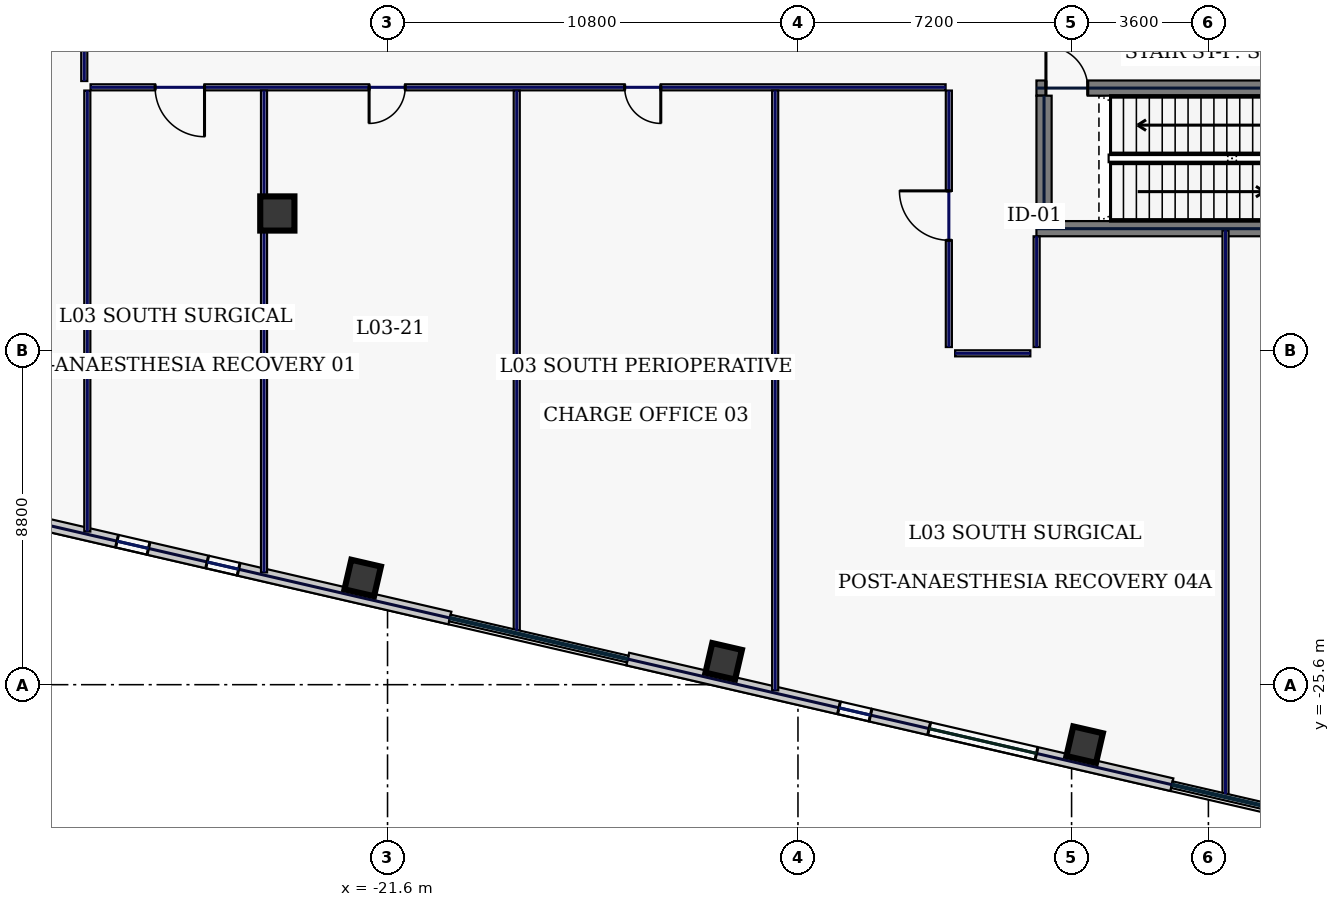
"""IFC4 building model, lengths in metres.
Left out: names, types, materials, properties, quantities, classifications, styles, units other than length and angle.
Written with IfcOpenShell. Run it as: python <this file> out.ifc"""

import sys

from ifc_helpers import new_model, si_unit, direction, frame, frame_2d, origin, origin_2d, place, context, subcontext, project, spatial, rectangle, hollow_rectangle, extrude, element, fill, save


model = new_model("IFC4")
c1 = context("Model", 3, precision=1e-05, world=origin(), true_north=direction((0.0, 1.0)))
c2 = subcontext(c1, "Body", "Model", "MODEL_VIEW")
j1 = project(units=[si_unit("LENGTHUNIT", "METRE"), si_unit("PLANEANGLEUNIT", "RADIAN")], contexts=[c1])
p1 = place(None, origin())
s1 = spatial("IfcSite", under=j1, at=p1, CompositionType="ELEMENT")
p2 = place(p1, origin())
s2 = spatial("IfcBuilding", under=s1, at=p2, CompositionType="ELEMENT")
p3 = place(p2, frame((0.0, 0.0, 18.4)))
s3 = spatial("IfcBuildingStorey", under=s2, at=p3, CompositionType="ELEMENT", Elevation=18.4)
p4 = place(p3, frame((-4.525, -13.6, 0.0), z_axis=(0.0, 0.0, 1.0), x_axis=(1.0, 0.0, 0.0)))
e1 = element("IfcWall", 1, at=p4, inside=s3, PredefinedType="SHEAR", context=c2, shape_type="SweptSolid", body=[
    extrude(rectangle(XDim=9.05, YDim=0.4, at=frame_2d((4.525, 0.0))), origin(), (0.0, 0.0, 1.0), 4.7),
])
p5 = place(p3, frame((-4.525, -9.9, 0.0), z_axis=(0.0, 0.0, 1.0), x_axis=(1.0, 0.0, 0.0)))
e2 = element("IfcWall", 2, at=p5, inside=s3, PredefinedType="SHEAR", context=c2, shape_type="SweptSolid", body=[
    extrude(rectangle(XDim=9.05, YDim=0.4, at=frame_2d((4.525, 0.0))), origin(), (0.0, 0.0, 1.0), 4.7),
])
p6 = place(p5, frame((0.25, 0.0, 0.0)))
e3 = element("IfcOpeningElement", 3, at=p6, cuts=e2, PredefinedType="OPENING", context=c2, shape_type="SweptSolid", body=[
    extrude(rectangle(XDim=1.1, YDim=2.2, at=frame_2d((0.55, 1.1))), frame((0.0, 0.21, 0.0), z_axis=(0.0, -1.0, 0.0), x_axis=(1.0, 0.0, 0.0)), (0.0, 0.0, 1.0), 0.42),
])
p7 = place(p3, frame((-4.325, -13.4, 0.0), z_axis=(0.0, 0.0, 1.0), x_axis=(0.0, 1.0, 0.0)))
e4 = element("IfcWall", 4, at=p7, inside=s3, PredefinedType="SHEAR", context=c2, shape_type="SweptSolid", body=[
    extrude(rectangle(XDim=3.3, YDim=0.4, at=frame_2d((1.65, 0.0))), origin(), (0.0, 0.0, 1.0), 4.7),
])
p8 = place(p3, frame((-24.5, -13.2, 0.0), z_axis=(0.0, 0.0, 1.0), x_axis=(1.0, 0.0, 0.0)))
e5 = element("IfcColumn", 5, at=p8, inside=s3, PredefinedType="COLUMN", context=c2, shape_type="SweptSolid", body=[
    extrude(hollow_rectangle(XDim=0.9, YDim=0.9, WallThickness=0.04, at=origin_2d()), origin(), (0.0, 0.0, 1.0), 4.7),
])
for number, where, z_axis, x_axis in (
    (6, (-22.254, -22.792, 0.0), (0.0, 0.0, 1.0), (0.974, -0.225, 0.0)),
    (7, (-12.755, -24.985, 0.0), (0.0, 0.0, 1.0), (0.974, -0.225, 0.0)),
    (8, (-3.256, -27.178, 0.0), (0.0, 0.0, 1.0), (0.974, -0.225, 0.0)),
):
    element("IfcColumn", number, at=place(p3, frame(where, z_axis=z_axis, x_axis=x_axis)), inside=s3, PredefinedType="COLUMN", context=c2, shape_type="SweptSolid", body=[
        extrude(hollow_rectangle(XDim=0.8, YDim=0.8, WallThickness=0.036, at=origin_2d()), origin(), (0.0, 0.0, 1.0), 4.7),
    ])
p9 = place(p3, frame((-42.029, -18.75, 0.0), z_axis=(0.0, 0.0, 1.0), x_axis=(0.97436993772, -0.224951604723, 0.0)))
e9 = element("IfcWall", 9, at=p9, inside=s3, PredefinedType="STANDARD", context=c2, shape_type="SweptSolid", body=[
    extrude(rectangle(XDim=22.651, YDim=0.34, at=frame_2d((11.326, 0.0))), origin(), (0.0, 0.0, 1.0), 4.7),
])
p10 = place(p9, frame((1.862, 0.0, 0.85)))
e10 = element("IfcOpeningElement", 10, at=p10, cuts=e9, PredefinedType="OPENING", context=c2, shape_type="SweptSolid", body=[
    extrude(rectangle(XDim=2.9, YDim=2.3, at=frame_2d((1.45, 1.15))), frame((0.0, 0.18, 0.0), z_axis=(0.0, -1.0, 0.0), x_axis=(1.0, 0.0, 0.0)), (0.0, 0.0, 1.0), 0.36),
])
p11 = place(p9, frame((6.346, 0.0, 0.85)))
e11 = element("IfcOpeningElement", 11, at=p11, cuts=e9, PredefinedType="OPENING", context=c2, shape_type="SweptSolid", body=[
    extrude(rectangle(XDim=2.9, YDim=2.3, at=frame_2d((1.45, 1.15))), frame((0.0, 0.18, 0.0), z_axis=(0.0, -1.0, 0.0), x_axis=(1.0, 0.0, 0.0)), (0.0, 0.0, 1.0), 0.36),
])
p12 = place(p9, frame((13.661, 0.0, 0.85)))
e12 = element("IfcOpeningElement", 12, at=p12, cuts=e9, PredefinedType="OPENING", context=c2, shape_type="SweptSolid", body=[
    extrude(rectangle(XDim=0.85, YDim=1.85, at=frame_2d((0.425, 0.925))), frame((0.0, 0.18, 0.0), z_axis=(0.0, -1.0, 0.0), x_axis=(1.0, 0.0, 0.0)), (0.0, 0.0, 1.0), 0.36),
])
p13 = place(p9, frame((16.095, 0.0, 0.85)))
e13 = element("IfcOpeningElement", 13, at=p13, cuts=e9, PredefinedType="OPENING", context=c2, shape_type="SweptSolid", body=[
    extrude(rectangle(XDim=0.85, YDim=1.85, at=frame_2d((0.425, 0.925))), frame((0.0, 0.18, 0.0), z_axis=(0.0, -1.0, 0.0), x_axis=(1.0, 0.0, 0.0)), (0.0, 0.0, 1.0), 0.36),
])
p14 = place(p3, frame((-15.281, -24.925, 0.0), z_axis=(0.0, 0.0, 1.0), x_axis=(0.974370193991, -0.22495049469, 0.0)))
e14 = element("IfcWall", 14, at=p14, inside=s3, PredefinedType="STANDARD", context=c2, shape_type="SweptSolid", body=[
    extrude(rectangle(XDim=14.697, YDim=0.34, at=frame_2d((7.349, 0.0))), origin(), (0.0, 0.0, 1.0), 4.7),
])
p15 = place(p14, frame((5.706, 0.0, 0.85)))
e15 = element("IfcOpeningElement", 15, at=p15, cuts=e14, PredefinedType="OPENING", context=c2, shape_type="SweptSolid", body=[
    extrude(rectangle(XDim=0.85, YDim=1.85, at=frame_2d((0.425, 0.925))), frame((0.0, 0.18, 0.0), z_axis=(0.0, -1.0, 0.0), x_axis=(1.0, 0.0, 0.0)), (0.0, 0.0, 1.0), 0.36),
])
p16 = place(p14, frame((8.141, 0.0, 0.85)))
e16 = element("IfcOpeningElement", 16, at=p16, cuts=e14, PredefinedType="OPENING", context=c2, shape_type="SweptSolid", body=[
    extrude(rectangle(XDim=2.9, YDim=2.3, at=frame_2d((1.45, 1.15))), frame((0.0, 0.18, 0.0), z_axis=(0.0, -1.0, 0.0), x_axis=(1.0, 0.0, 0.0)), (0.0, 0.0, 1.0), 0.36),
])
p17 = place(p3, frame((-29.58, -9.715, 0.0), z_axis=(0.0, 0.0, 1.0), x_axis=(0.0, 1.0, 0.0)))
e17 = element("IfcWall", 17, at=p17, inside=s3, PredefinedType="PARTITIONING", context=c2, shape_type="SweptSolid", body=[
    extrude(rectangle(XDim=19.43, YDim=0.16, at=frame_2d((9.715, 0.0))), origin(), (0.0, 0.0, 1.0), 4.7),
])
p18 = place(p17, frame((2.019, 0.0, 0.0)))
e18 = element("IfcOpeningElement", 18, at=p18, cuts=e17, PredefinedType="OPENING", context=c2, shape_type="SweptSolid", body=[
    extrude(rectangle(XDim=0.95, YDim=2.2, at=frame_2d((0.475, 1.1))), frame((0.0, 0.09, 0.0), z_axis=(0.0, -1.0, 0.0), x_axis=(1.0, 0.0, 0.0)), (0.0, 0.0, 1.0), 0.18),
])
p19 = place(p17, frame((6.725, 0.0, 0.0)))
e19 = element("IfcOpeningElement", 19, at=p19, cuts=e17, PredefinedType="OPENING", context=c2, shape_type="SweptSolid", body=[
    extrude(rectangle(XDim=0.95, YDim=2.2, at=frame_2d((0.475, 1.1))), frame((0.0, 0.09, 0.0), z_axis=(0.0, -1.0, 0.0), x_axis=(1.0, 0.0, 0.0)), (0.0, 0.0, 1.0), 0.18),
])
p20 = place(p17, frame((11.925, 0.0, 0.0)))
e20 = element("IfcOpeningElement", 20, at=p20, cuts=e17, PredefinedType="OPENING", context=c2, shape_type="SweptSolid", body=[
    extrude(rectangle(XDim=0.95, YDim=2.2, at=frame_2d((0.475, 1.1))), frame((0.0, 0.09, 0.0), z_axis=(0.0, -1.0, 0.0), x_axis=(1.0, 0.0, 0.0)), (0.0, 0.0, 1.0), 0.18),
])
p21 = place(p17, frame((16.631, 0.0, 0.0)))
e21 = element("IfcOpeningElement", 21, at=p21, cuts=e17, PredefinedType="OPENING", context=c2, shape_type="SweptSolid", body=[
    extrude(rectangle(XDim=0.95, YDim=2.2, at=frame_2d((0.475, 1.1))), frame((0.0, 0.09, 0.0), z_axis=(0.0, -1.0, 0.0), x_axis=(1.0, 0.0, 0.0)), (0.0, 0.0, 1.0), 0.18),
])
p22 = place(p3, frame((-4.52, -13.8, 0.0), z_axis=(0.0, 0.0, 1.0), x_axis=(0.0, -1.0, 0.0)))
e22 = element("IfcWall", 22, at=p22, inside=s3, PredefinedType="PARTITIONING", context=c2, shape_type="SweptSolid", body=[
    extrude(rectangle(XDim=2.915, YDim=0.16, at=frame_2d((1.458, 0.0))), origin(), (0.0, 0.0, 1.0), 4.7),
])
p23 = place(p3, frame((-4.685, -16.88, 0.0), z_axis=(0.0, 0.0, 1.0), x_axis=(-1.0, 0.0, 0.0)))
e23 = element("IfcWall", 23, at=p23, inside=s3, PredefinedType="PARTITIONING", context=c2, shape_type="SweptSolid", body=[
    extrude(rectangle(XDim=1.98, YDim=0.16, at=frame_2d((0.99, 0.0))), origin(), (0.0, 0.0, 1.0), 4.7),
])
p24 = place(p3, frame((-6.83, -16.715, 0.0), z_axis=(0.0, 0.0, 1.0), x_axis=(0.0, 1.0, 0.0)))
e24 = element("IfcWall", 24, at=p24, inside=s3, PredefinedType="PARTITIONING", context=c2, shape_type="SweptSolid", body=[
    extrude(rectangle(XDim=6.75, YDim=0.16, at=frame_2d((3.375, 0.0))), origin(), (0.0, 0.0, 1.0), 4.7),
])
p25 = place(p24, frame((2.81, 0.0, 0.0)))
e25 = element("IfcOpeningElement", 25, at=p25, cuts=e24, PredefinedType="OPENING", context=c2, shape_type="SweptSolid", body=[
    extrude(rectangle(XDim=1.3, YDim=2.2, at=frame_2d((0.65, 1.1))), frame((0.0, 0.09, 0.0), z_axis=(0.0, -1.0, 0.0), x_axis=(1.0, 0.0, 0.0)), (0.0, 0.0, 1.0), 0.18),
])
p26 = place(p3, frame((-6.915, -9.88, 0.0), z_axis=(0.0, 0.0, 1.0), x_axis=(-1.0, 0.0, 0.0)))
e26 = element("IfcWall", 26, at=p26, inside=s3, PredefinedType="PARTITIONING", context=c2, shape_type="SweptSolid", body=[
    extrude(rectangle(XDim=22.5, YDim=0.16, at=frame_2d((11.25, 0.0))), origin(), (0.0, 0.0, 1.0), 4.7),
])
p27 = place(p26, frame((19.501, 0.0, 0.0)))
e27 = element("IfcOpeningElement", 27, at=p27, cuts=e26, PredefinedType="OPENING", context=c2, shape_type="SweptSolid", body=[
    extrude(rectangle(XDim=1.3, YDim=2.2, at=frame_2d((0.65, 1.1))), frame((0.0, 0.09, 0.0), z_axis=(0.0, -1.0, 0.0), x_axis=(1.0, 0.0, 0.0)), (0.0, 0.0, 1.0), 0.18),
])
p28 = place(p26, frame((14.22, 0.0, 0.0)))
e28 = element("IfcOpeningElement", 28, at=p28, cuts=e26, PredefinedType="OPENING", context=c2, shape_type="SweptSolid", body=[
    extrude(rectangle(XDim=0.95, YDim=2.2, at=frame_2d((0.475, 1.1))), frame((0.0, 0.09, 0.0), z_axis=(0.0, -1.0, 0.0), x_axis=(1.0, 0.0, 0.0)), (0.0, 0.0, 1.0), 0.18),
])
p29 = place(p26, frame((7.495, 0.0, 0.0)))
e29 = element("IfcOpeningElement", 29, at=p29, cuts=e26, PredefinedType="OPENING", context=c2, shape_type="SweptSolid", body=[
    extrude(rectangle(XDim=0.95, YDim=2.2, at=frame_2d((0.475, 1.1))), frame((0.0, 0.09, 0.0), z_axis=(0.0, -1.0, 0.0), x_axis=(1.0, 0.0, 0.0)), (0.0, 0.0, 1.0), 0.18),
])
p30 = place(p3, frame((-29.5, -21.571, 0.0), z_axis=(0.0, 0.0, 1.0), x_axis=(0.0, 1.0, 0.0)))
e30 = element("IfcWall", 30, at=p30, inside=s3, PredefinedType="PARTITIONING", context=c2, shape_type="SweptSolid", body=[
    extrude(rectangle(XDim=11.605, YDim=0.16, at=frame_2d((5.803, 0.0))), origin(), (0.0, 0.0, 1.0), 4.7),
])
p31 = place(p3, frame((-24.85, -22.644, 0.0), z_axis=(0.0, 0.0, 1.0), x_axis=(0.0, 1.0, 0.0)))
e31 = element("IfcWall", 31, at=p31, inside=s3, PredefinedType="PARTITIONING", context=c2, shape_type="SweptSolid", body=[
    extrude(rectangle(XDim=12.679, YDim=0.16, at=frame_2d((6.339, 0.0))), origin(), (0.0, 0.0, 1.0), 4.7),
])
p32 = place(p3, frame((-18.2, -24.179, 0.0), z_axis=(0.0, 0.0, 1.0), x_axis=(0.0, 1.0, 0.0)))
e32 = element("IfcWall", 32, at=p32, inside=s3, PredefinedType="PARTITIONING", context=c2, shape_type="SweptSolid", body=[
    extrude(rectangle(XDim=14.214, YDim=0.16, at=frame_2d((7.107, 0.0))), origin(), (0.0, 0.0, 1.0), 4.7),
])
p33 = place(p3, frame((-11.4, -25.749, 0.0), z_axis=(0.0, 0.0, 1.0), x_axis=(0.0, 1.0, 0.0)))
e33 = element("IfcWall", 33, at=p33, inside=s3, PredefinedType="PARTITIONING", context=c2, shape_type="SweptSolid", body=[
    extrude(rectangle(XDim=15.784, YDim=0.16, at=frame_2d((7.892, 0.0))), origin(), (0.0, 0.0, 1.0), 4.7),
])
p34 = place(p3, frame((0.45, -28.485, 0.0), z_axis=(0.0, 0.0, 1.0), x_axis=(0.0, 1.0, 0.0)))
e34 = element("IfcWall", 34, at=p34, inside=s3, PredefinedType="PARTITIONING", context=c2, shape_type="SweptSolid", body=[
    extrude(rectangle(XDim=14.845, YDim=0.16, at=frame_2d((7.423, 0.0))), origin(), (0.0, 0.0, 1.0), 4.7),
])
p35 = place(p12, origin())
e35 = element("IfcWindow", 35, at=p35, inside=s3, PartitioningType="SINGLE_PANEL", PredefinedType="WINDOW", context=c2, shape_type="SweptSolid", body=[
    extrude(rectangle(XDim=0.85, YDim=1.85, at=frame_2d((0.425, 0.925))), frame((0.0, 0.03, 0.0), z_axis=(0.0, -1.0, 0.0), x_axis=(1.0, 0.0, 0.0)), (0.0, 0.0, 1.0), 0.06),
])
fill(e12, e35)
p36 = place(p13, origin())
e36 = element("IfcWindow", 36, at=p36, inside=s3, PartitioningType="SINGLE_PANEL", PredefinedType="WINDOW", context=c2, shape_type="SweptSolid", body=[
    extrude(rectangle(XDim=0.85, YDim=1.85, at=frame_2d((0.425, 0.925))), frame((0.0, 0.03, 0.0), z_axis=(0.0, -1.0, 0.0), x_axis=(1.0, 0.0, 0.0)), (0.0, 0.0, 1.0), 0.06),
])
fill(e13, e36)
p37 = place(p15, origin())
e37 = element("IfcWindow", 37, at=p37, inside=s3, PartitioningType="SINGLE_PANEL", PredefinedType="WINDOW", context=c2, shape_type="SweptSolid", body=[
    extrude(rectangle(XDim=0.85, YDim=1.85, at=frame_2d((0.425, 0.925))), frame((0.0, 0.03, 0.0), z_axis=(0.0, -1.0, 0.0), x_axis=(1.0, 0.0, 0.0)), (0.0, 0.0, 1.0), 0.06),
])
fill(e15, e37)
p38 = place(p16, origin())
e38 = element("IfcWindow", 38, at=p38, inside=s3, PartitioningType="SINGLE_PANEL", PredefinedType="WINDOW", context=c2, shape_type="SweptSolid", body=[
    extrude(rectangle(XDim=2.9, YDim=2.3, at=frame_2d((1.45, 1.15))), frame((0.0, 0.03, 0.0), z_axis=(0.0, -1.0, 0.0), x_axis=(1.0, 0.0, 0.0)), (0.0, 0.0, 1.0), 0.06),
])
fill(e16, e38)
p39 = place(p6, origin())
e39 = element("IfcDoor", 39, at=p39, inside=s3, OperationType="SINGLE_SWING_LEFT", PredefinedType="DOOR", context=c2, shape_type="SweptSolid", body=[
    extrude(rectangle(XDim=1.1, YDim=2.2, at=frame_2d((0.55, 1.1))), frame((0.0, 0.025, 0.0), z_axis=(0.0, -1.0, 0.0), x_axis=(1.0, 0.0, 0.0)), (0.0, 0.0, 1.0), 0.05),
])
fill(e3, e39)
p40 = place(p27, origin())
e40 = element("IfcDoor", 40, at=p40, inside=s3, OperationType="SINGLE_SWING_LEFT", PredefinedType="DOOR", context=c2, shape_type="SweptSolid", body=[
    extrude(rectangle(XDim=1.3, YDim=2.2, at=frame_2d((0.65, 1.1))), frame((0.0, 0.025, 0.0), z_axis=(0.0, -1.0, 0.0), x_axis=(1.0, 0.0, 0.0)), (0.0, 0.0, 1.0), 0.05),
])
fill(e27, e40)
p41 = place(p28, origin())
e41 = element("IfcDoor", 41, at=p41, inside=s3, OperationType="SINGLE_SWING_RIGHT", PredefinedType="DOOR", context=c2, shape_type="SweptSolid", body=[
    extrude(rectangle(XDim=0.95, YDim=2.2, at=frame_2d((0.475, 1.1))), frame((0.0, 0.025, 0.0), z_axis=(0.0, -1.0, 0.0), x_axis=(1.0, 0.0, 0.0)), (0.0, 0.0, 1.0), 0.05),
])
fill(e28, e41)
p42 = place(p29, origin())
e42 = element("IfcDoor", 42, at=p42, inside=s3, OperationType="SINGLE_SWING_LEFT", PredefinedType="DOOR", context=c2, shape_type="SweptSolid", body=[
    extrude(rectangle(XDim=0.95, YDim=2.2, at=frame_2d((0.475, 1.1))), frame((0.0, 0.025, 0.0), z_axis=(0.0, -1.0, 0.0), x_axis=(1.0, 0.0, 0.0)), (0.0, 0.0, 1.0), 0.05),
])
fill(e29, e42)
p43 = place(p25, origin())
e43 = element("IfcDoor", 43, at=p43, inside=s3, OperationType="SINGLE_SWING_RIGHT", PredefinedType="DOOR", context=c2, shape_type="SweptSolid", body=[
    extrude(rectangle(XDim=1.3, YDim=2.2, at=frame_2d((0.65, 1.1))), frame((0.0, 0.025, 0.0), z_axis=(0.0, -1.0, 0.0), x_axis=(1.0, 0.0, 0.0)), (0.0, 0.0, 1.0), 0.05),
])
fill(e25, e43)
save(model, sys.argv[1])
